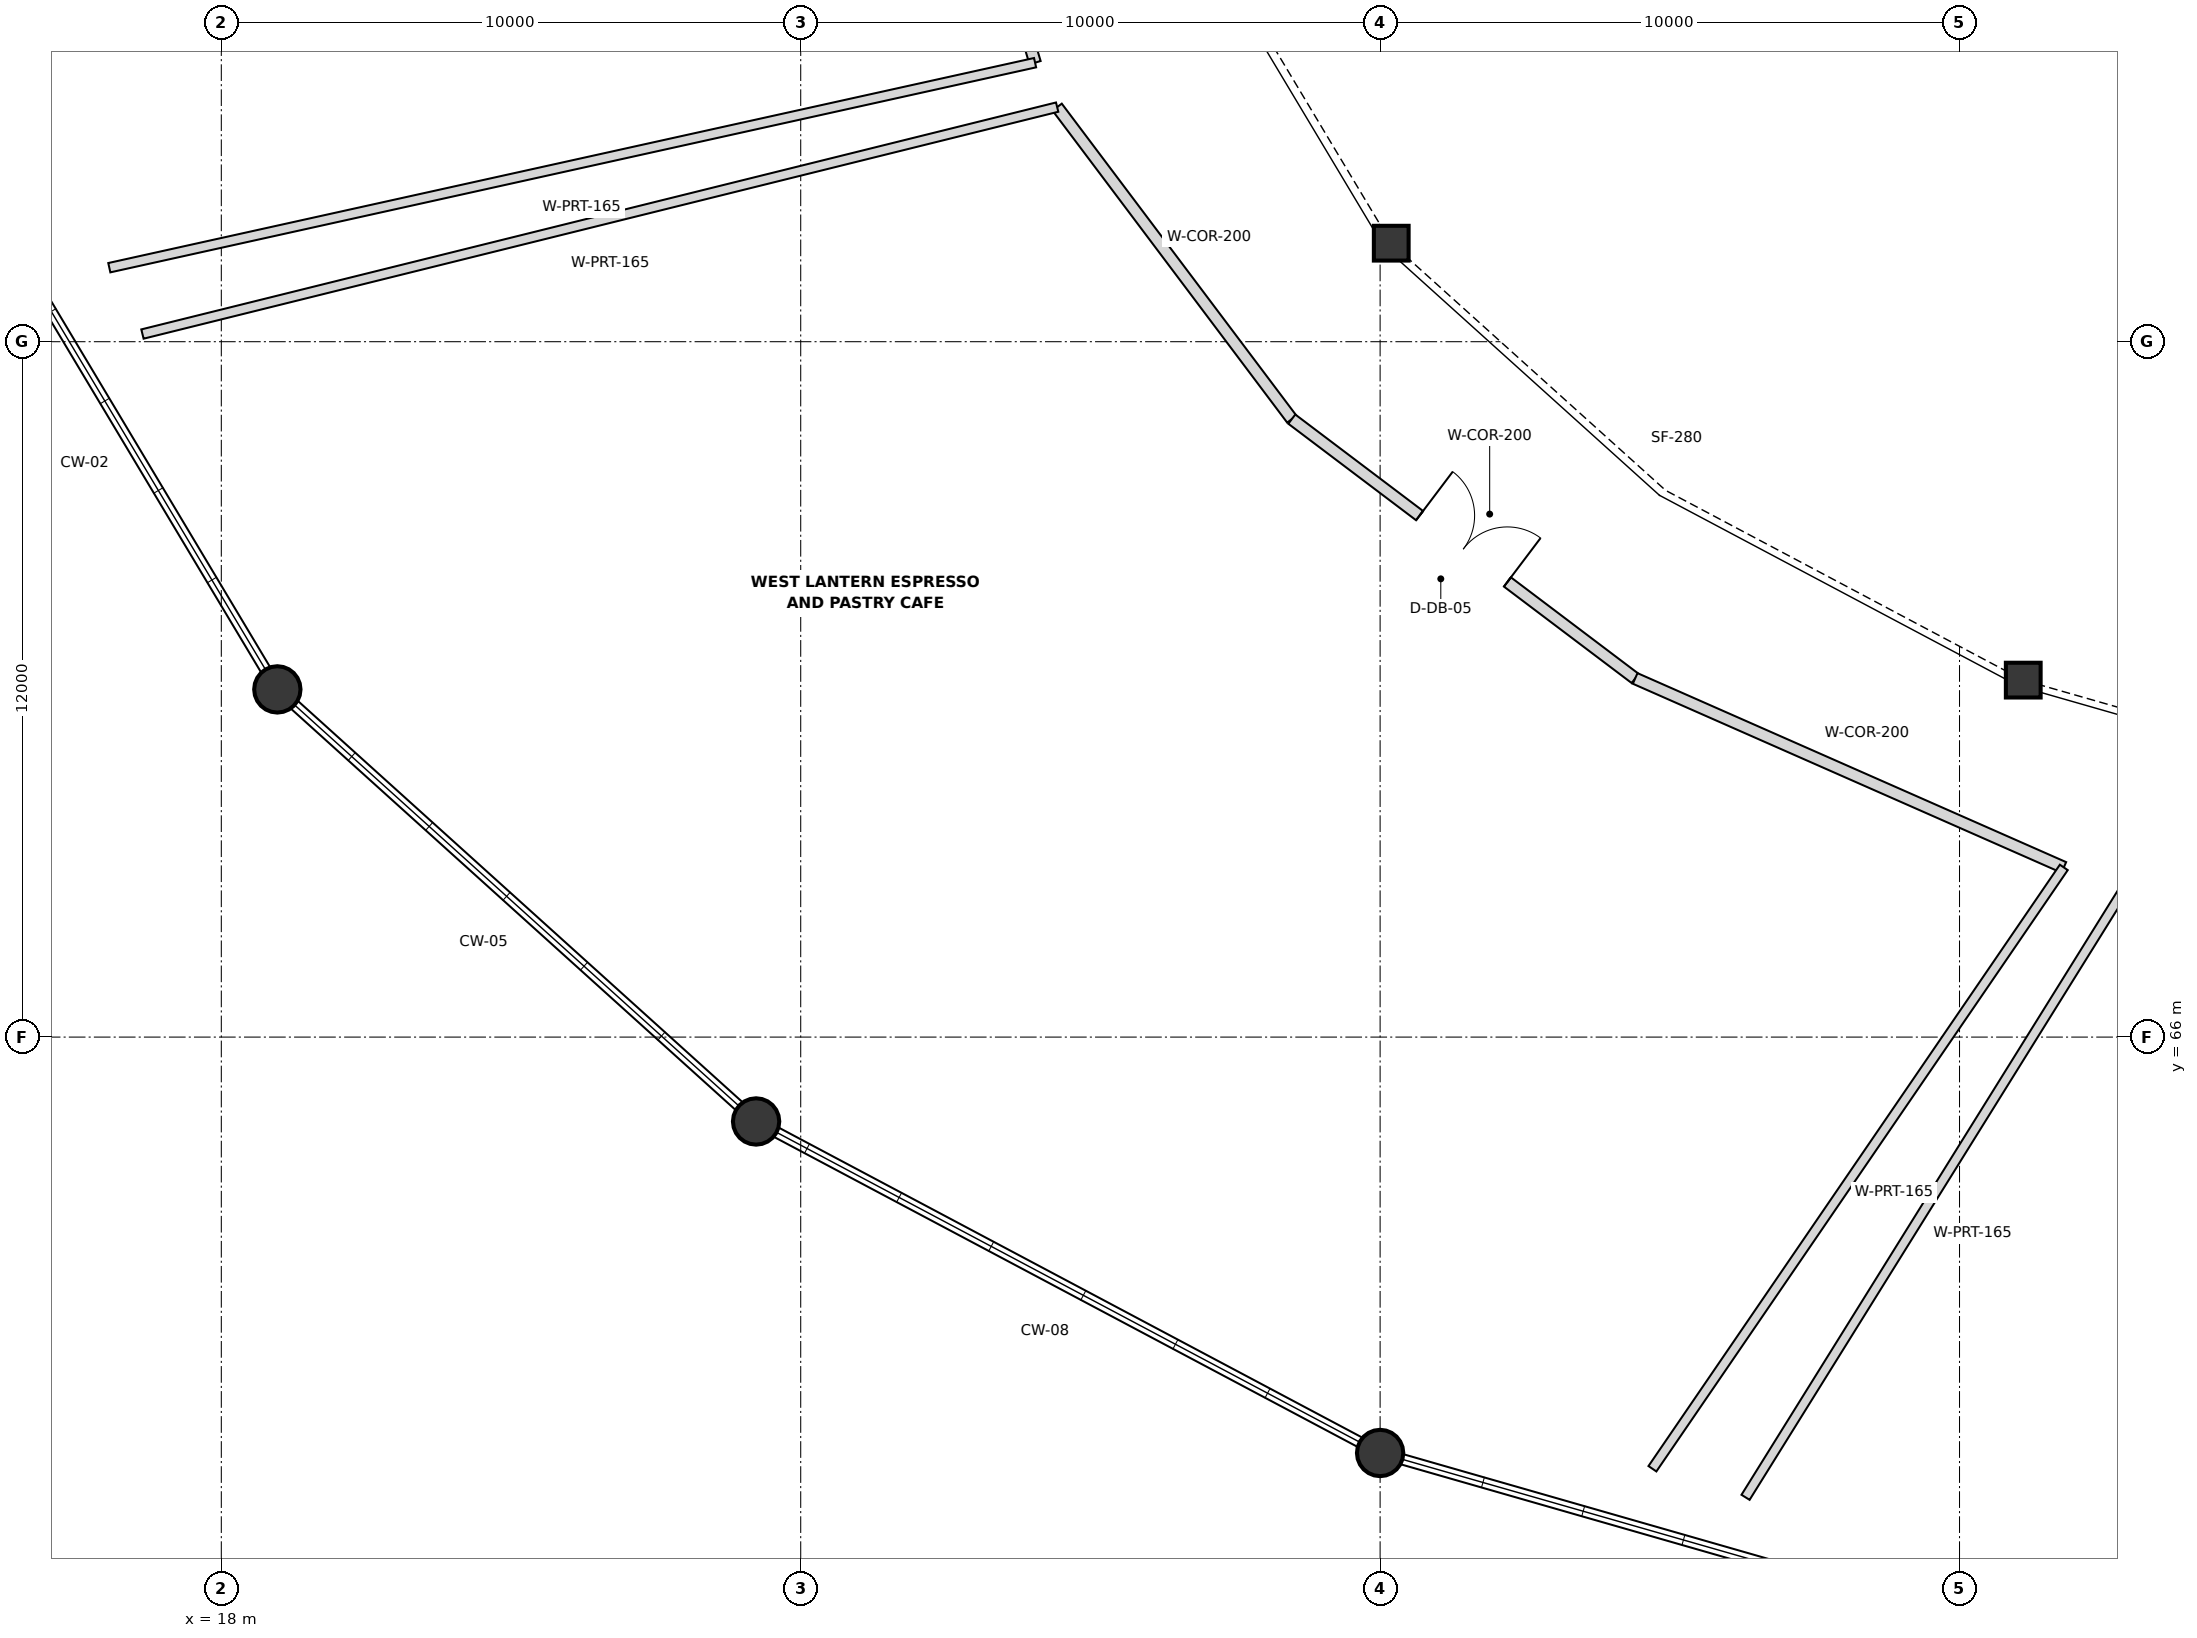
"""IFC4 building model, lengths in metres.
Left out: names, types, materials, properties, quantities, classifications, styles, units other than length and angle.
Written with IfcOpenShell. Run it as: python <this file> out.ifc"""

import sys

from ifc_helpers import new_model, si_unit, direction, frame, frame_2d, origin, origin_2d, place, context, subcontext, project, spatial, rectangle, circle, extrude, element, fill, save


model = new_model("IFC4")
c1 = context("Model", 3, precision=1e-05, world=origin(), true_north=direction((0.0, 1.0)))
c2 = subcontext(c1, "Body", "Model", "MODEL_VIEW")
j1 = project(units=[si_unit("LENGTHUNIT", "METRE"), si_unit("PLANEANGLEUNIT", "RADIAN")], contexts=[c1])
p1 = place(None, origin())
s1 = spatial("IfcSite", under=j1, at=p1, CompositionType="ELEMENT")
p2 = place(p1, origin())
s2 = spatial("IfcBuilding", under=s1, at=p2, CompositionType="ELEMENT")
p3 = place(p2, frame((0.0, 0.0, 5.4)))
s3 = spatial("IfcBuildingStorey", under=s2, at=p3, CompositionType="ELEMENT", Elevation=5.4)
for number, where, z_axis, x_axis in (
    (1, (18.967, 72.0, 0.0), (0.0, 0.0, 1.0), (1.0, 0.0, 0.0)),
    (2, (27.23, 64.544, 0.0), (0.0, 0.0, 1.0), (1.0, 0.0, 0.0)),
    (3, (38.0, 58.823, 0.0), (0.0, 0.0, 1.0), (1.0, 0.0, 0.0)),
):
    element("IfcColumn", number, at=place(p3, frame(where, z_axis=z_axis, x_axis=x_axis)), inside=s3, PredefinedType="COLUMN", context=c2, shape_type="SweptSolid", body=[
        extrude(circle(Radius=0.4, at=origin_2d()), origin(), (0.0, 0.0, 1.0), 4.2),
    ])
for number, where, z_axis, x_axis in (
    (4, (38.192, 79.7, 0.0), (0.0, 0.0, 1.0), (1.0, 0.0, 0.0)),
    (5, (49.1, 72.16, 0.0), (0.0, 0.0, 1.0), (1.0, 0.0, 0.0)),
):
    element("IfcColumn", number, at=place(p3, frame(where, z_axis=z_axis, x_axis=x_axis)), inside=s3, PredefinedType="COLUMN", context=c2, shape_type="SweptSolid", body=[
        extrude(rectangle(XDim=0.6, YDim=0.6, at=origin_2d()), origin(), (0.0, 0.0, 1.0), 4.2),
    ])
p4 = place(p3, frame((30.545, 87.839, 0.0), z_axis=(0.0, 0.0, 1.0), x_axis=(0.286078916962, -0.958206059921, 0.0)))
e6 = element("IfcWall", 6, at=p4, inside=s3, PredefinedType="PARTITIONING", context=c2, shape_type="SweptSolid", body=[
    extrude(rectangle(XDim=5.243, YDim=0.2, at=frame_2d((2.622, 0.0))), origin(), (0.0, 0.0, 1.0), 3.1),
])
p5 = place(p3, frame((32.045, 82.815, 0.0), z_axis=(0.0, 0.0, 1.0), x_axis=(-0.976352807819, -0.216183243256, 0.0)))
e7 = element("IfcWall", 7, at=p5, inside=s3, PredefinedType="PARTITIONING", context=c2, shape_type="SweptSolid", body=[
    extrude(rectangle(XDim=16.365, YDim=0.165, at=frame_2d((8.183, 0.0))), origin(), (0.0, 0.0, 1.0), 3.1),
])
p6 = place(p3, frame((32.426, 82.048, 0.0), z_axis=(0.0, 0.0, 1.0), x_axis=(0.601141590092, -0.799142533383, 0.0)))
e8 = element("IfcWall", 8, at=p6, inside=s3, PredefinedType="PARTITIONING", context=c2, shape_type="SweptSolid", body=[
    extrude(rectangle(XDim=6.737, YDim=0.2, at=frame_2d((3.369, 0.0))), origin(), (0.0, 0.0, 1.0), 3.1),
])
p7 = place(p3, frame((36.476, 76.664, 0.0), z_axis=(0.0, 0.0, 1.0), x_axis=(0.798019104586, -0.602632150417, 0.0)))
e9 = element("IfcWall", 9, at=p7, inside=s3, PredefinedType="PARTITIONING", context=c2, shape_type="SweptSolid", body=[
    extrude(rectangle(XDim=7.426, YDim=0.2, at=frame_2d((3.713, 0.0))), origin(), (0.0, 0.0, 1.0), 3.1),
])
p8 = place(p7, frame((2.763, 0.0, 0.0)))
e10 = element("IfcOpeningElement", 10, at=p8, cuts=e9, PredefinedType="OPENING", context=c2, shape_type="SweptSolid", body=[
    extrude(rectangle(XDim=1.9, YDim=2.25, at=frame_2d((0.95, 1.125))), frame((0.0, 0.11, 0.0), z_axis=(0.0, -1.0, 0.0), x_axis=(1.0, 0.0, 0.0)), (0.0, 0.0, 1.0), 0.22),
])
p9 = place(p3, frame((42.402, 72.189, 0.0), z_axis=(0.0, 0.0, 1.0), x_axis=(0.915046329832, -0.403348750167, 0.0)))
e11 = element("IfcWall", 11, at=p9, inside=s3, PredefinedType="PARTITIONING", context=c2, shape_type="SweptSolid", body=[
    extrude(rectangle(XDim=8.085, YDim=0.2, at=frame_2d((4.042, 0.0))), origin(), (0.0, 0.0, 1.0), 3.1),
])
p10 = place(p3, frame((32.426, 82.048, 0.0), z_axis=(0.0, 0.0, 1.0), x_axis=(-0.970585860066, -0.240755245507, 0.0)))
e12 = element("IfcWall", 12, at=p10, inside=s3, PredefinedType="PARTITIONING", context=c2, shape_type="SweptSolid", body=[
    extrude(rectangle(XDim=16.266, YDim=0.165, at=frame_2d((8.133, 0.0))), origin(), (0.0, 0.0, 1.0), 3.1),
])
p11 = place(p3, frame((49.8, 68.928, 0.0), z_axis=(0.0, 0.0, 1.0), x_axis=(-0.564688092093, -0.825304403628, 0.0)))
e13 = element("IfcWall", 13, at=p11, inside=s3, PredefinedType="PARTITIONING", context=c2, shape_type="SweptSolid", body=[
    extrude(rectangle(XDim=12.573, YDim=0.165, at=frame_2d((6.287, 0.0))), origin(), (0.0, 0.0, 1.0), 3.1),
])
p12 = place(p3, frame((50.871, 68.598, 0.0), z_axis=(0.0, 0.0, 1.0), x_axis=(-0.528656830676, -0.84883564686, 0.0)))
e14 = element("IfcWall", 14, at=p12, inside=s3, PredefinedType="PARTITIONING", context=c2, shape_type="SweptSolid", body=[
    extrude(rectangle(XDim=12.417, YDim=0.165, at=frame_2d((6.208, 0.0))), origin(), (0.0, 0.0, 1.0), 3.1),
])
p13 = place(p8, origin())
e15 = element("IfcDoor", 15, at=p13, inside=s3, OperationType="DOUBLE_DOOR_SINGLE_SWING", PredefinedType="DOOR", context=c2, shape_type="SweptSolid", body=[
    extrude(rectangle(XDim=1.9, YDim=2.25, at=frame_2d((0.95, 1.125))), frame((0.0, 0.025, 0.0), z_axis=(0.0, -1.0, 0.0), x_axis=(1.0, 0.0, 0.0)), (0.0, 0.0, 1.0), 0.05),
])
fill(e10, e15)
save(model, sys.argv[1])
